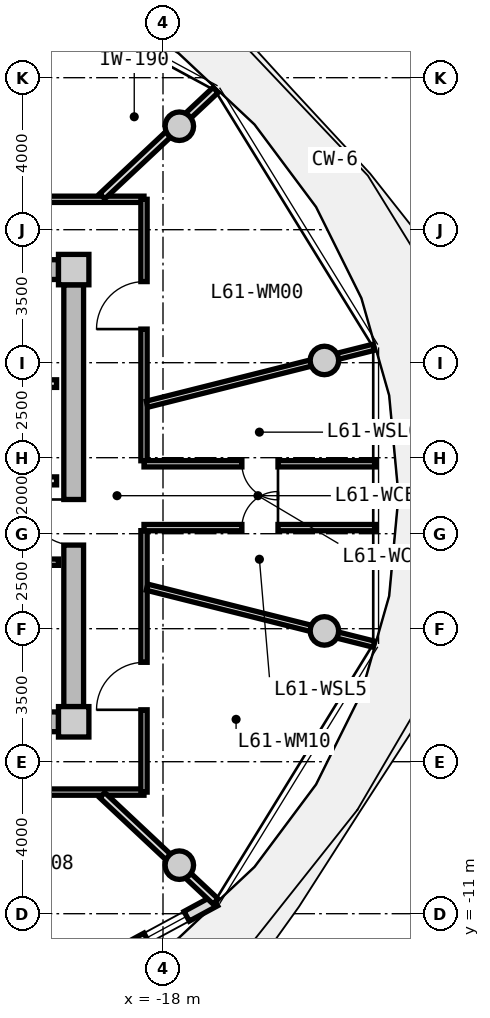
"""IFC4 building model, lengths in metres.
Left out: names, types, materials, properties, quantities, classifications, styles, units other than length and angle.
Written with IfcOpenShell. Run it as: python <this file> out.ifc"""

import sys

from ifc_helpers import new_model, si_unit, direction, frame, frame_2d, origin, origin_2d, place, context, subcontext, project, spatial, rectangle, circle, extrude, source, transform, mapped, element, fill, save


model = new_model("IFC4")
c1 = context("Model", 3, precision=1e-05, world=origin(), true_north=direction((0.0, 1.0)))
c2 = subcontext(c1, "Body", "Model", "MODEL_VIEW")
j1 = project(units=[si_unit("LENGTHUNIT", "METRE"), si_unit("PLANEANGLEUNIT", "RADIAN")], contexts=[c1])
p1 = place(None, origin())
s1 = spatial("IfcSite", under=j1, at=p1, CompositionType="ELEMENT")
p2 = place(p1, origin())
s2 = spatial("IfcBuilding", under=s1, at=p2, CompositionType="ELEMENT")
p3 = place(p2, frame((0.0, 0.0, 196.75)))
s3 = spatial("IfcBuildingStorey", under=s2, at=p3, CompositionType="ELEMENT", Elevation=196.75)
m1 = source(origin(), c2, "Body", "SweptSolid", [
    extrude(rectangle(XDim=0.8, YDim=0.8, at=origin_2d()), origin(), (0.0, 0.0, 1.0), 3.05),
])
for number, where, z_axis, x_axis in (
    (1, (-20.35, -5.95, 0.0), (0.0, 0.0, 1.0), (1.0, 0.0, 0.0)),
    (2, (-20.35, 5.95, 0.0), (0.0, 0.0, 1.0), (1.0, 0.0, 0.0)),
):
    element("IfcColumn", number, at=place(p3, frame(where, z_axis=z_axis, x_axis=x_axis)), inside=s3, PredefinedType="COLUMN", context=c2, shape_type="MappedRepresentation", body=[
        mapped(m1, transform((0.0, 0.0, 0.0), x_axis=(1.0, 0.0, 0.0), y_axis=(0.0, 1.0, 0.0), z_axis=(0.0, 0.0, 1.0), scale=1.0)),
    ])
m2 = source(origin(), c2, "Body", "SweptSolid", [
    extrude(rectangle(XDim=14.5, YDim=0.52, at=frame_2d((7.25, 0.0))), origin(), (0.0, 0.0, 1.0), 2.76),
])
for number, where, z_axis, x_axis in (
    (3, (-35.25, 5.95, 0.0), (0.0, 0.0, 1.0), (1.0, 0.0, 0.0)),
    (4, (-20.75, -5.95, 0.0), (0.0, 0.0, 1.0), (-1.0, 0.0, 0.0)),
):
    element("IfcWall", number, at=place(p3, frame(where, z_axis=z_axis, x_axis=x_axis)), inside=s3, PredefinedType="SHEAR", context=c2, shape_type="MappedRepresentation", body=[
        mapped(m2, transform((0.0, 0.0, 0.0), x_axis=(1.0, 0.0, 0.0), y_axis=(0.0, 1.0, 0.0), z_axis=(0.0, 0.0, 1.0), scale=1.0)),
    ])
m3 = source(origin(), c2, "Body", "SweptSolid", [
    extrude(rectangle(XDim=11.1, YDim=0.52, at=frame_2d((5.55, 0.0))), origin(), (0.0, 0.0, 1.0), 2.76),
])
p4 = place(p3, frame((-20.35, 5.55, 0.0), z_axis=(0.0, 0.0, 1.0), x_axis=(0.0, -1.0, 0.0)))
e5 = element("IfcWall", 5, at=p4, inside=s3, PredefinedType="SHEAR", context=c2, shape_type="MappedRepresentation", body=[
    mapped(m3, transform((0.0, 0.0, 0.0), x_axis=(1.0, 0.0, 0.0), y_axis=(0.0, 1.0, 0.0), z_axis=(0.0, 0.0, 1.0), scale=1.0)),
])
p5 = place(p4, frame((5.65, 0.0, 0.0)))
e6 = element("IfcOpeningElement", 6, at=p5, cuts=e5, PredefinedType="OPENING", context=c2, shape_type="SweptSolid", body=[
    extrude(rectangle(XDim=1.2, YDim=2.15, at=frame_2d((0.6, 1.075))), frame((0.0, 0.27, 0.0), z_axis=(0.0, -1.0, 0.0), x_axis=(1.0, 0.0, 0.0)), (0.0, 0.0, 1.0), 0.54),
])
m4 = source(origin(), c2, "Body", "SweptSolid", [
    extrude(circle(Radius=0.375, at=origin_2d()), origin(), (0.0, 0.0, 1.0), 3.05),
])
for number, where, z_axis, x_axis in (
    (7, (-13.753, 3.559, 0.0), (0.0, 0.0, 1.0), (1.0, 0.0, 0.0)),
    (8, (-17.57, 9.723, 0.0), (0.0, 0.0, 1.0), (1.0, 0.0, 0.0)),
    (9, (-17.57, -9.723, 0.0), (0.0, 0.0, 1.0), (1.0, 0.0, 0.0)),
    (10, (-13.753, -3.559, 0.0), (0.0, 0.0, 1.0), (1.0, 0.0, 0.0)),
):
    element("IfcColumn", number, at=place(p3, frame(where, z_axis=z_axis, x_axis=x_axis)), inside=s3, PredefinedType="COLUMN", context=c2, shape_type="MappedRepresentation", body=[
        mapped(m4, transform((0.0, 0.0, 0.0), x_axis=(1.0, 0.0, 0.0), y_axis=(0.0, 1.0, 0.0), z_axis=(0.0, 0.0, 1.0), scale=1.0)),
    ])
m5 = source(origin(), c2, "Body", "SweptSolid", [
    extrude(rectangle(XDim=8.197, YDim=0.29, at=frame_2d((4.099, 0.0))), origin(), (0.0, 0.0, 1.0), 2.76),
])
p6 = place(p3, frame((-16.63, -10.663, 0.0), z_axis=(0.0, 0.0, 1.0), x_axis=(-0.879369910001, -0.476139224791, 0.0)))
e11 = element("IfcWall", 11, at=p6, inside=s3, PredefinedType="SOLIDWALL", context=c2, shape_type="MappedRepresentation", body=[
    mapped(m5, transform((0.0, 0.0, 0.0), x_axis=(1.0, 0.0, 0.0), y_axis=(0.0, 1.0, 0.0), z_axis=(0.0, 0.0, 1.0), scale=1.0)),
])
p7 = place(p6, frame((6.18, 0.0, 0.0)))
e12 = element("IfcOpeningElement", 12, at=p7, cuts=e11, PredefinedType="OPENING", context=c2, shape_type="SweptSolid", body=[
    extrude(rectangle(XDim=1.15, YDim=2.25, at=frame_2d((0.575, 1.125))), frame((0.0, 0.155, 0.0), z_axis=(0.0, -1.0, 0.0), x_axis=(1.0, 0.0, 0.0)), (0.0, 0.0, 1.0), 0.31),
])
p8 = place(p6, frame((0.85, 0.0, 0.85)))
e13 = element("IfcOpeningElement", 13, at=p8, cuts=e11, PredefinedType="OPENING", context=c2, shape_type="SweptSolid", body=[
    extrude(rectangle(XDim=1.2, YDim=1.5, at=frame_2d((0.6, 0.75))), frame((0.0, 0.155, 0.0), z_axis=(0.0, -1.0, 0.0), x_axis=(1.0, 0.0, 0.0)), (0.0, 0.0, 1.0), 0.31),
])
m6 = source(origin(), c2, "Body", "SweptSolid", [
    extrude(rectangle(XDim=3.2, YDim=0.2, at=frame_2d((1.6, 0.0))), origin(), (0.0, 0.0, 1.0), 2.745),
])
p9 = place(p3, frame((-24.0, 2.95, 0.0), z_axis=(0.0, 0.0, 1.0), x_axis=(1.0, 0.0, 0.0)))
e14 = element("IfcWall", 14, at=p9, inside=s3, PredefinedType="PARTITIONING", context=c2, shape_type="MappedRepresentation", body=[
    mapped(m6, transform((0.0, 0.0, 0.0), x_axis=(1.0, 0.0, 0.0), y_axis=(0.0, 1.0, 0.0), z_axis=(0.0, 0.0, 1.0), scale=1.0)),
])
m7 = source(origin(), c2, "Body", "SweptSolid", [
    extrude(rectangle(XDim=6.66, YDim=0.21, at=frame_2d((3.33, 0.0))), origin(), (0.0, 0.0, 1.0), 2.745),
])
p10 = place(p3, frame((-27.46, 0.39, 0.0), z_axis=(0.0, 0.0, 1.0), x_axis=(1.0, 0.0, 0.0)))
e15 = element("IfcWall", 15, at=p10, inside=s3, PredefinedType="PARTITIONING", context=c2, shape_type="MappedRepresentation", body=[
    mapped(m7, transform((0.0, 0.0, 0.0), x_axis=(1.0, 0.0, 0.0), y_axis=(0.0, 1.0, 0.0), z_axis=(0.0, 0.0, 1.0), scale=1.0)),
])
p11 = place(p10, frame((1.0, 0.0, 0.0)))
e16 = element("IfcOpeningElement", 16, at=p11, cuts=e15, PredefinedType="OPENING", context=c2, shape_type="SweptSolid", body=[
    extrude(rectangle(XDim=1.2, YDim=2.15, at=frame_2d((0.6, 1.075))), frame((0.0, 0.115, 0.0), z_axis=(0.0, -1.0, 0.0), x_axis=(1.0, 0.0, 0.0)), (0.0, 0.0, 1.0), 0.23),
])
m8 = source(origin(), c2, "Body", "SweptSolid", [
    extrude(rectangle(XDim=2.7, YDim=0.165, at=frame_2d((1.35, 0.0))), origin(), (0.0, 0.0, 1.0), 2.745),
])
p12 = place(p3, frame((-23.45, -1.75, 0.0), z_axis=(0.0, 0.0, 1.0), x_axis=(1.0, 0.0, 0.0)))
e17 = element("IfcWall", 17, at=p12, inside=s3, PredefinedType="PARTITIONING", context=c2, shape_type="MappedRepresentation", body=[
    mapped(m8, transform((0.0, 0.0, 0.0), x_axis=(1.0, 0.0, 0.0), y_axis=(0.0, 1.0, 0.0), z_axis=(0.0, 0.0, 1.0), scale=1.0)),
])
p13 = place(p12, frame((0.85, 0.0, 0.0)))
e18 = element("IfcOpeningElement", 18, at=p13, cuts=e17, PredefinedType="OPENING", context=c2, shape_type="SweptSolid", body=[
    extrude(rectangle(XDim=0.925, YDim=2.1, at=frame_2d((0.462, 1.05))), frame((0.0, 0.093, 0.0), z_axis=(0.0, -1.0, 0.0), x_axis=(1.0, 0.0, 0.0)), (0.0, 0.0, 1.0), 0.185),
])
m9 = source(origin(), c2, "Body", "SweptSolid", [
    extrude(rectangle(XDim=8.58, YDim=0.165, at=frame_2d((4.29, 0.0))), origin(), (0.0, 0.0, 1.0), 2.745),
])
p14 = place(p3, frame((-27.08, 7.8, 0.0), z_axis=(0.0, 0.0, 1.0), x_axis=(1.0, 0.0, 0.0)))
e19 = element("IfcWall", 19, at=p14, inside=s3, PredefinedType="PARTITIONING", context=c2, shape_type="MappedRepresentation", body=[
    mapped(m9, transform((0.0, 0.0, 0.0), x_axis=(1.0, 0.0, 0.0), y_axis=(0.0, 1.0, 0.0), z_axis=(0.0, 0.0, 1.0), scale=1.0)),
])
p15 = place(p14, frame((3.802, 0.0, 0.0)))
e20 = element("IfcOpeningElement", 20, at=p15, cuts=e19, PredefinedType="OPENING", context=c2, shape_type="SweptSolid", body=[
    extrude(rectangle(XDim=1.25, YDim=2.2, at=frame_2d((0.625, 1.1))), frame((0.0, 0.093, 0.0), z_axis=(0.0, -1.0, 0.0), x_axis=(1.0, 0.0, 0.0)), (0.0, 0.0, 1.0), 0.185),
])
m10 = source(origin(), c2, "Body", "SweptSolid", [
    extrude(rectangle(XDim=19.0, YDim=0.165, at=frame_2d((9.5, 0.0))), origin(), (0.0, 0.0, 1.0), 2.745),
])
p16 = place(p3, frame((-18.5, -7.8, 0.0), z_axis=(0.0, 0.0, 1.0), x_axis=(-1.0, 0.0, 0.0)))
e21 = element("IfcWall", 21, at=p16, inside=s3, PredefinedType="PARTITIONING", context=c2, shape_type="MappedRepresentation", body=[
    mapped(m10, transform((0.0, 0.0, 0.0), x_axis=(1.0, 0.0, 0.0), y_axis=(0.0, 1.0, 0.0), z_axis=(0.0, 0.0, 1.0), scale=1.0)),
])
p17 = place(p16, frame((12.569, 0.0, 0.0)))
e22 = element("IfcOpeningElement", 22, at=p17, cuts=e21, PredefinedType="OPENING", context=c2, shape_type="SweptSolid", body=[
    extrude(rectangle(XDim=1.25, YDim=2.2, at=frame_2d((0.625, 1.1))), frame((0.0, 0.093, 0.0), z_axis=(0.0, -1.0, 0.0), x_axis=(1.0, 0.0, 0.0)), (0.0, 0.0, 1.0), 0.185),
])
p18 = place(p16, frame((7.868, 0.0, 0.0)))
e23 = element("IfcOpeningElement", 23, at=p18, cuts=e21, PredefinedType="OPENING", context=c2, shape_type="SweptSolid", body=[
    extrude(rectangle(XDim=1.25, YDim=2.2, at=frame_2d((0.625, 1.1))), frame((0.0, 0.093, 0.0), z_axis=(0.0, -1.0, 0.0), x_axis=(1.0, 0.0, 0.0)), (0.0, 0.0, 1.0), 0.185),
])
p19 = place(p16, frame((3.559, 0.0, 0.0)))
e24 = element("IfcOpeningElement", 24, at=p19, cuts=e21, PredefinedType="OPENING", context=c2, shape_type="SweptSolid", body=[
    extrude(rectangle(XDim=1.25, YDim=2.2, at=frame_2d((0.625, 1.1))), frame((0.0, 0.093, 0.0), z_axis=(0.0, -1.0, 0.0), x_axis=(1.0, 0.0, 0.0)), (0.0, 0.0, 1.0), 0.185),
])
m11 = source(origin(), c2, "Body", "SweptSolid", [
    extrude(rectangle(XDim=6.88, YDim=0.165, at=frame_2d((3.44, 0.0))), origin(), (0.0, 0.0, 1.0), 2.745),
])
p20 = place(p3, frame((-18.5, 7.8, 0.0), z_axis=(0.0, 0.0, 1.0), x_axis=(0.0, -1.0, 0.0)))
e25 = element("IfcWall", 25, at=p20, inside=s3, PredefinedType="PARTITIONING", context=c2, shape_type="MappedRepresentation", body=[
    mapped(m11, transform((0.0, 0.0, 0.0), x_axis=(1.0, 0.0, 0.0), y_axis=(0.0, 1.0, 0.0), z_axis=(0.0, 0.0, 1.0), scale=1.0)),
])
p21 = place(p20, frame((2.166, 0.0, 0.0)))
e26 = element("IfcOpeningElement", 26, at=p21, cuts=e25, PredefinedType="OPENING", context=c2, shape_type="SweptSolid", body=[
    extrude(rectangle(XDim=1.25, YDim=2.2, at=frame_2d((0.625, 1.1))), frame((0.0, 0.093, 0.0), z_axis=(0.0, -1.0, 0.0), x_axis=(1.0, 0.0, 0.0)), (0.0, 0.0, 1.0), 0.185),
])
p22 = place(p3, frame((-18.5, -0.92, 0.0), z_axis=(0.0, 0.0, 1.0), x_axis=(0.0, -1.0, 0.0)))
e27 = element("IfcWall", 27, at=p22, inside=s3, PredefinedType="PARTITIONING", context=c2, shape_type="MappedRepresentation", body=[
    mapped(m11, transform((0.0, 0.0, 0.0), x_axis=(1.0, 0.0, 0.0), y_axis=(0.0, 1.0, 0.0), z_axis=(0.0, 0.0, 1.0), scale=1.0)),
])
p23 = place(p22, frame((3.464, 0.0, 0.0)))
e28 = element("IfcOpeningElement", 28, at=p23, cuts=e27, PredefinedType="OPENING", context=c2, shape_type="SweptSolid", body=[
    extrude(rectangle(XDim=1.25, YDim=2.2, at=frame_2d((0.625, 1.1))), frame((0.0, 0.093, 0.0), z_axis=(0.0, -1.0, 0.0), x_axis=(1.0, 0.0, 0.0)), (0.0, 0.0, 1.0), 0.185),
])
m12 = source(origin(), c2, "Body", "SweptSolid", [
    extrude(rectangle(XDim=6.157, YDim=0.165, at=frame_2d((3.079, 0.0))), origin(), (0.0, 0.0, 1.0), 2.345),
])
for number, where, z_axis, x_axis in (
    (29, (-18.42, -2.407, 0.0), (0.0, 0.0, 1.0), (0.97, -0.244, 0.0)),
    (30, (-18.42, 2.407, 0.0), (0.0, 0.0, 1.0), (0.97, 0.244, 0.0)),
):
    element("IfcWall", number, at=place(p3, frame(where, z_axis=z_axis, x_axis=x_axis)), inside=s3, PredefinedType="PARTITIONING", context=c2, shape_type="MappedRepresentation", body=[
        mapped(m12, transform((0.0, 0.0, 0.0), x_axis=(1.0, 0.0, 0.0), y_axis=(0.0, 1.0, 0.0), z_axis=(0.0, 0.0, 1.0), scale=1.0)),
    ])
m13 = source(origin(), c2, "Body", "SweptSolid", [
    extrude(rectangle(XDim=6.101, YDim=0.165, at=frame_2d((3.051, 0.0))), origin(), (0.0, 0.0, 1.0), 2.745),
])
p24 = place(p3, frame((-18.5, 0.84, 0.0), z_axis=(0.0, 0.0, 1.0), x_axis=(1.0, 0.0, 0.0)))
e31 = element("IfcWall", 31, at=p24, inside=s3, PredefinedType="PARTITIONING", context=c2, shape_type="MappedRepresentation", body=[
    mapped(m13, transform((0.0, 0.0, 0.0), x_axis=(1.0, 0.0, 0.0), y_axis=(0.0, 1.0, 0.0), z_axis=(0.0, 0.0, 1.0), scale=1.0)),
])
p25 = place(p24, frame((2.576, 0.0, 0.0)))
e32 = element("IfcOpeningElement", 32, at=p25, cuts=e31, PredefinedType="OPENING", context=c2, shape_type="SweptSolid", body=[
    extrude(rectangle(XDim=0.95, YDim=2.1, at=frame_2d((0.475, 1.05))), frame((0.0, 0.093, 0.0), z_axis=(0.0, -1.0, 0.0), x_axis=(1.0, 0.0, 0.0)), (0.0, 0.0, 1.0), 0.185),
])
p26 = place(p3, frame((-12.399, -0.84, 0.0), z_axis=(0.0, 0.0, 1.0), x_axis=(-1.0, 0.0, 0.0)))
e33 = element("IfcWall", 33, at=p26, inside=s3, PredefinedType="PARTITIONING", context=c2, shape_type="MappedRepresentation", body=[
    mapped(m13, transform((0.0, 0.0, 0.0), x_axis=(1.0, 0.0, 0.0), y_axis=(0.0, 1.0, 0.0), z_axis=(0.0, 0.0, 1.0), scale=1.0)),
])
p27 = place(p26, frame((2.576, 0.0, 0.0)))
e34 = element("IfcOpeningElement", 34, at=p27, cuts=e33, PredefinedType="OPENING", context=c2, shape_type="SweptSolid", body=[
    extrude(rectangle(XDim=0.95, YDim=2.1, at=frame_2d((0.475, 1.05))), frame((0.0, 0.093, 0.0), z_axis=(0.0, -1.0, 0.0), x_axis=(1.0, 0.0, 0.0)), (0.0, 0.0, 1.0), 0.185),
])
m14 = source(origin(), c2, "Body", "SweptSolid", [
    extrude(rectangle(XDim=4.089, YDim=0.19, at=frame_2d((2.044, 0.0))), origin(), (0.0, 0.0, 1.0), 2.345),
])
for number, where, z_axis, x_axis in (
    (35, (-19.598, 7.88, 0.0), (0.0, 0.0, 1.0), (0.729, 0.684, 0.0)),
    (36, (-19.598, -7.88, 0.0), (0.0, 0.0, 1.0), (0.729, -0.684, 0.0)),
):
    element("IfcWall", number, at=place(p3, frame(where, z_axis=z_axis, x_axis=x_axis)), inside=s3, PredefinedType="PARTITIONING", context=c2, shape_type="MappedRepresentation", body=[
        mapped(m14, transform((0.0, 0.0, 0.0), x_axis=(1.0, 0.0, 0.0), y_axis=(0.0, 1.0, 0.0), z_axis=(0.0, 0.0, 1.0), scale=1.0)),
    ])
m15 = source(origin(), c2, "Body", "SweptSolid", [
    extrude(rectangle(XDim=1.2, YDim=1.5, at=frame_2d((0.6, 0.75))), frame((0.0, 0.03, 0.0), z_axis=(0.0, -1.0, 0.0), x_axis=(1.0, 0.0, 0.0)), (0.0, 0.0, 1.0), 0.06),
])
p28 = place(p8, origin())
e37 = element("IfcWindow", 37, at=p28, inside=s3, PartitioningType="SINGLE_PANEL", PredefinedType="WINDOW", context=c2, shape_type="MappedRepresentation", body=[
    mapped(m15, transform((0.0, 0.0, 0.0), x_axis=(1.0, 0.0, 0.0), y_axis=(0.0, 1.0, 0.0), z_axis=(0.0, 0.0, 1.0), scale=1.0)),
])
fill(e13, e37)
m16 = source(origin(), c2, "Body", "SweptSolid", [
    extrude(rectangle(XDim=1.2, YDim=2.15, at=frame_2d((0.6, 1.075))), frame((0.0, 0.025, 0.0), z_axis=(0.0, -1.0, 0.0), x_axis=(1.0, 0.0, 0.0)), (0.0, 0.0, 1.0), 0.05),
])
p29 = place(p5, frame((1.2, 0.0, 0.0), z_axis=(0.0, 0.0, 1.0), x_axis=(-1.0, 0.0, 0.0)))
e38 = element("IfcDoor", 38, at=p29, inside=s3, OperationType="SINGLE_SWING_RIGHT", PredefinedType="DOOR", context=c2, shape_type="MappedRepresentation", body=[
    mapped(m16, transform((0.0, 0.0, 0.0), x_axis=(1.0, 0.0, 0.0), y_axis=(0.0, 1.0, 0.0), z_axis=(0.0, 0.0, 1.0), scale=1.0)),
])
fill(e6, e38)
m17 = source(origin(), c2, "Body", "SweptSolid", [
    extrude(rectangle(XDim=0.95, YDim=2.1, at=frame_2d((0.475, 1.05))), frame((0.0, 0.025, 0.0), z_axis=(0.0, -1.0, 0.0), x_axis=(1.0, 0.0, 0.0)), (0.0, 0.0, 1.0), 0.05),
])
p30 = place(p27, frame((0.95, 0.0, 0.0), z_axis=(0.0, 0.0, 1.0), x_axis=(-1.0, 0.0, 0.0)))
e39 = element("IfcDoor", 39, at=p30, inside=s3, OperationType="SINGLE_SWING_RIGHT", PredefinedType="DOOR", context=c2, shape_type="MappedRepresentation", body=[
    mapped(m17, transform((0.0, 0.0, 0.0), x_axis=(1.0, 0.0, 0.0), y_axis=(0.0, 1.0, 0.0), z_axis=(0.0, 0.0, 1.0), scale=1.0)),
])
fill(e34, e39)
p31 = place(p25, frame((0.95, 0.0, 0.0), z_axis=(0.0, 0.0, 1.0), x_axis=(-1.0, 0.0, 0.0)))
e40 = element("IfcDoor", 40, at=p31, inside=s3, OperationType="SINGLE_SWING_LEFT", PredefinedType="DOOR", context=c2, shape_type="MappedRepresentation", body=[
    mapped(m17, transform((0.0, 0.0, 0.0), x_axis=(1.0, 0.0, 0.0), y_axis=(0.0, 1.0, 0.0), z_axis=(0.0, 0.0, 1.0), scale=1.0)),
])
fill(e32, e40)
m18 = source(origin(), c2, "Body", "SweptSolid", [
    extrude(rectangle(XDim=1.25, YDim=2.2, at=frame_2d((0.625, 1.1))), frame((0.0, 0.025, 0.0), z_axis=(0.0, -1.0, 0.0), x_axis=(1.0, 0.0, 0.0)), (0.0, 0.0, 1.0), 0.05),
])
p32 = place(p21, frame((1.25, 0.0, 0.0), z_axis=(0.0, 0.0, 1.0), x_axis=(-1.0, 0.0, 0.0)))
e41 = element("IfcDoor", 41, at=p32, inside=s3, OperationType="SINGLE_SWING_LEFT", PredefinedType="DOOR", context=c2, shape_type="MappedRepresentation", body=[
    mapped(m18, transform((0.0, 0.0, 0.0), x_axis=(1.0, 0.0, 0.0), y_axis=(0.0, 1.0, 0.0), z_axis=(0.0, 0.0, 1.0), scale=1.0)),
])
fill(e26, e41)
p33 = place(p23, frame((1.25, 0.0, 0.0), z_axis=(0.0, 0.0, 1.0), x_axis=(-1.0, 0.0, 0.0)))
e42 = element("IfcDoor", 42, at=p33, inside=s3, OperationType="SINGLE_SWING_LEFT", PredefinedType="DOOR", context=c2, shape_type="MappedRepresentation", body=[
    mapped(m18, transform((0.0, 0.0, 0.0), x_axis=(1.0, 0.0, 0.0), y_axis=(0.0, 1.0, 0.0), z_axis=(0.0, 0.0, 1.0), scale=1.0)),
])
fill(e28, e42)
save(model, sys.argv[1])
